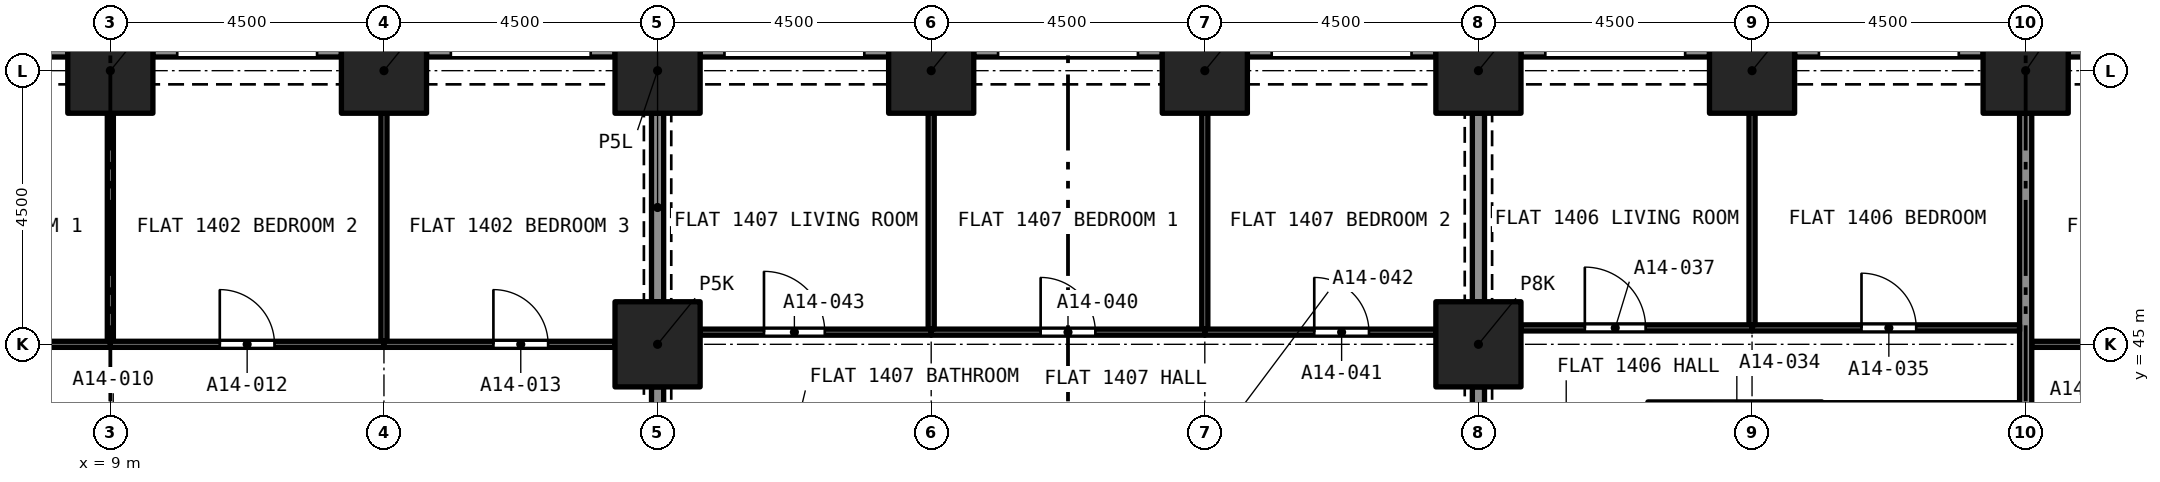
"""IFC4 building model, lengths in metres.
Left out: names, types, materials, properties, quantities, classifications, styles, units other than length and angle.
Written with IfcOpenShell. Run it as: python <this file> out.ifc"""

import sys

from ifc_helpers import new_model, si_unit, direction, frame, frame_2d, origin, origin_2d, place, context, subcontext, project, spatial, rectangle, extrude, element, fill, save


model = new_model("IFC4")
c1 = context("Model", 3, precision=1e-05, world=origin(), true_north=direction((0.0, 1.0)))
c2 = subcontext(c1, "Body", "Model", "MODEL_VIEW")
j1 = project(units=[si_unit("LENGTHUNIT", "METRE"), si_unit("PLANEANGLEUNIT", "RADIAN")], contexts=[c1])
p1 = place(None, origin())
s1 = spatial("IfcSite", under=j1, at=p1, CompositionType="ELEMENT")
p2 = place(p1, origin())
s2 = spatial("IfcBuilding", under=s1, at=p2, CompositionType="ELEMENT")
p3 = place(p2, frame((0.0, 0.0, 56.0)))
s3 = spatial("IfcBuildingStorey", under=s2, at=p3, CompositionType="ELEMENT", Elevation=56.0)
for number, where, z_axis, x_axis in (
    (1, (18.0, 45.0, 0.0), (0.0, 0.0, 1.0), (1.0, 0.0, 0.0)),
    (2, (31.5, 45.0, 0.0), (0.0, 0.0, 1.0), (1.0, 0.0, 0.0)),
    (3, (9.0, 49.5, 0.0), (0.0, 0.0, 1.0), (1.0, 0.0, 0.0)),
    (4, (13.5, 49.5, 0.0), (0.0, 0.0, 1.0), (1.0, 0.0, 0.0)),
    (5, (18.0, 49.5, 0.0), (0.0, 0.0, 1.0), (1.0, 0.0, 0.0)),
    (6, (22.5, 49.5, 0.0), (0.0, 0.0, 1.0), (1.0, 0.0, 0.0)),
    (7, (27.0, 49.5, 0.0), (0.0, 0.0, 1.0), (1.0, 0.0, 0.0)),
    (8, (31.5, 49.5, 0.0), (0.0, 0.0, 1.0), (1.0, 0.0, 0.0)),
    (9, (36.0, 49.5, 0.0), (0.0, 0.0, 1.0), (1.0, 0.0, 0.0)),
    (10, (40.5, 49.5, 0.0), (0.0, 0.0, 1.0), (1.0, 0.0, 0.0)),
):
    element("IfcColumn", number, at=place(p3, frame(where, z_axis=z_axis, x_axis=x_axis)), inside=s3, PredefinedType="COLUMN", context=c2, shape_type="SweptSolid", body=[
        extrude(rectangle(XDim=1.4, YDim=1.4, at=origin_2d()), origin(), (0.0, 0.0, 1.0), 3.2),
    ])
p4 = place(p3, frame((41.2, 49.875, 0.0), z_axis=(0.0, 0.0, 1.0), x_axis=(1.0, 0.0, 0.0)))
e11 = element("IfcWall", 11, at=p4, inside=s3, PredefinedType="SOLIDWALL", context=c2, shape_type="SweptSolid", body=[
    extrude(rectangle(XDim=3.1, YDim=0.3, at=frame_2d((1.55, 0.0))), origin(), (0.0, 0.0, 1.0), 3.2),
])
p5 = place(p4, frame((0.4, 0.0, 0.45)))
e12 = element("IfcOpeningElement", 12, at=p5, cuts=e11, PredefinedType="OPENING", context=c2, shape_type="SweptSolid", body=[
    extrude(rectangle(XDim=2.3, YDim=1.95, at=frame_2d((1.15, 0.975))), frame((0.0, 0.16, 0.0), z_axis=(0.0, -1.0, 0.0), x_axis=(1.0, 0.0, 0.0)), (0.0, 0.0, 1.0), 0.32),
])
p6 = place(p3, frame((36.7, 49.875, 0.0), z_axis=(0.0, 0.0, 1.0), x_axis=(1.0, 0.0, 0.0)))
e13 = element("IfcWall", 13, at=p6, inside=s3, PredefinedType="SOLIDWALL", context=c2, shape_type="SweptSolid", body=[
    extrude(rectangle(XDim=3.1, YDim=0.3, at=frame_2d((1.55, 0.0))), origin(), (0.0, 0.0, 1.0), 3.2),
])
p7 = place(p6, frame((0.4, 0.0, 0.45)))
e14 = element("IfcOpeningElement", 14, at=p7, cuts=e13, PredefinedType="OPENING", context=c2, shape_type="SweptSolid", body=[
    extrude(rectangle(XDim=2.3, YDim=1.95, at=frame_2d((1.15, 0.975))), frame((0.0, 0.16, 0.0), z_axis=(0.0, -1.0, 0.0), x_axis=(1.0, 0.0, 0.0)), (0.0, 0.0, 1.0), 0.32),
])
p8 = place(p3, frame((32.2, 49.875, 0.0), z_axis=(0.0, 0.0, 1.0), x_axis=(1.0, 0.0, 0.0)))
e15 = element("IfcWall", 15, at=p8, inside=s3, PredefinedType="SOLIDWALL", context=c2, shape_type="SweptSolid", body=[
    extrude(rectangle(XDim=3.1, YDim=0.3, at=frame_2d((1.55, 0.0))), origin(), (0.0, 0.0, 1.0), 3.2),
])
p9 = place(p8, frame((0.4, 0.0, 0.45)))
e16 = element("IfcOpeningElement", 16, at=p9, cuts=e15, PredefinedType="OPENING", context=c2, shape_type="SweptSolid", body=[
    extrude(rectangle(XDim=2.3, YDim=1.95, at=frame_2d((1.15, 0.975))), frame((0.0, 0.16, 0.0), z_axis=(0.0, -1.0, 0.0), x_axis=(1.0, 0.0, 0.0)), (0.0, 0.0, 1.0), 0.32),
])
p10 = place(p3, frame((27.7, 49.875, 0.0), z_axis=(0.0, 0.0, 1.0), x_axis=(1.0, 0.0, 0.0)))
e17 = element("IfcWall", 17, at=p10, inside=s3, PredefinedType="SOLIDWALL", context=c2, shape_type="SweptSolid", body=[
    extrude(rectangle(XDim=3.1, YDim=0.3, at=frame_2d((1.55, 0.0))), origin(), (0.0, 0.0, 1.0), 3.2),
])
p11 = place(p10, frame((0.4, 0.0, 0.45)))
e18 = element("IfcOpeningElement", 18, at=p11, cuts=e17, PredefinedType="OPENING", context=c2, shape_type="SweptSolid", body=[
    extrude(rectangle(XDim=2.3, YDim=1.95, at=frame_2d((1.15, 0.975))), frame((0.0, 0.16, 0.0), z_axis=(0.0, -1.0, 0.0), x_axis=(1.0, 0.0, 0.0)), (0.0, 0.0, 1.0), 0.32),
])
p12 = place(p3, frame((23.2, 49.875, 0.0), z_axis=(0.0, 0.0, 1.0), x_axis=(1.0, 0.0, 0.0)))
e19 = element("IfcWall", 19, at=p12, inside=s3, PredefinedType="SOLIDWALL", context=c2, shape_type="SweptSolid", body=[
    extrude(rectangle(XDim=3.1, YDim=0.3, at=frame_2d((1.55, 0.0))), origin(), (0.0, 0.0, 1.0), 3.2),
])
p13 = place(p12, frame((0.4, 0.0, 0.45)))
e20 = element("IfcOpeningElement", 20, at=p13, cuts=e19, PredefinedType="OPENING", context=c2, shape_type="SweptSolid", body=[
    extrude(rectangle(XDim=2.3, YDim=1.95, at=frame_2d((1.15, 0.975))), frame((0.0, 0.16, 0.0), z_axis=(0.0, -1.0, 0.0), x_axis=(1.0, 0.0, 0.0)), (0.0, 0.0, 1.0), 0.32),
])
p14 = place(p3, frame((18.7, 49.875, 0.0), z_axis=(0.0, 0.0, 1.0), x_axis=(1.0, 0.0, 0.0)))
e21 = element("IfcWall", 21, at=p14, inside=s3, PredefinedType="SOLIDWALL", context=c2, shape_type="SweptSolid", body=[
    extrude(rectangle(XDim=3.1, YDim=0.3, at=frame_2d((1.55, 0.0))), origin(), (0.0, 0.0, 1.0), 3.2),
])
p15 = place(p14, frame((0.4, 0.0, 0.45)))
e22 = element("IfcOpeningElement", 22, at=p15, cuts=e21, PredefinedType="OPENING", context=c2, shape_type="SweptSolid", body=[
    extrude(rectangle(XDim=2.3, YDim=1.95, at=frame_2d((1.15, 0.975))), frame((0.0, 0.16, 0.0), z_axis=(0.0, -1.0, 0.0), x_axis=(1.0, 0.0, 0.0)), (0.0, 0.0, 1.0), 0.32),
])
p16 = place(p3, frame((14.2, 49.875, 0.0), z_axis=(0.0, 0.0, 1.0), x_axis=(1.0, 0.0, 0.0)))
e23 = element("IfcWall", 23, at=p16, inside=s3, PredefinedType="SOLIDWALL", context=c2, shape_type="SweptSolid", body=[
    extrude(rectangle(XDim=3.1, YDim=0.3, at=frame_2d((1.55, 0.0))), origin(), (0.0, 0.0, 1.0), 3.2),
])
p17 = place(p16, frame((0.4, 0.0, 0.45)))
e24 = element("IfcOpeningElement", 24, at=p17, cuts=e23, PredefinedType="OPENING", context=c2, shape_type="SweptSolid", body=[
    extrude(rectangle(XDim=2.3, YDim=1.95, at=frame_2d((1.15, 0.975))), frame((0.0, 0.16, 0.0), z_axis=(0.0, -1.0, 0.0), x_axis=(1.0, 0.0, 0.0)), (0.0, 0.0, 1.0), 0.32),
])
p18 = place(p3, frame((9.7, 49.875, 0.0), z_axis=(0.0, 0.0, 1.0), x_axis=(1.0, 0.0, 0.0)))
e25 = element("IfcWall", 25, at=p18, inside=s3, PredefinedType="SOLIDWALL", context=c2, shape_type="SweptSolid", body=[
    extrude(rectangle(XDim=3.1, YDim=0.3, at=frame_2d((1.55, 0.0))), origin(), (0.0, 0.0, 1.0), 3.2),
])
p19 = place(p18, frame((0.4, 0.0, 0.45)))
e26 = element("IfcOpeningElement", 26, at=p19, cuts=e25, PredefinedType="OPENING", context=c2, shape_type="SweptSolid", body=[
    extrude(rectangle(XDim=2.3, YDim=1.95, at=frame_2d((1.15, 0.975))), frame((0.0, 0.16, 0.0), z_axis=(0.0, -1.0, 0.0), x_axis=(1.0, 0.0, 0.0)), (0.0, 0.0, 1.0), 0.32),
])
p20 = place(p3, frame((5.2, 49.875, 0.0), z_axis=(0.0, 0.0, 1.0), x_axis=(1.0, 0.0, 0.0)))
e27 = element("IfcWall", 27, at=p20, inside=s3, PredefinedType="SOLIDWALL", context=c2, shape_type="SweptSolid", body=[
    extrude(rectangle(XDim=3.1, YDim=0.3, at=frame_2d((1.55, 0.0))), origin(), (0.0, 0.0, 1.0), 3.2),
])
p21 = place(p20, frame((0.4, 0.0, 0.45)))
e28 = element("IfcOpeningElement", 28, at=p21, cuts=e27, PredefinedType="OPENING", context=c2, shape_type="SweptSolid", body=[
    extrude(rectangle(XDim=2.3, YDim=1.95, at=frame_2d((1.15, 0.975))), frame((0.0, 0.16, 0.0), z_axis=(0.0, -1.0, 0.0), x_axis=(1.0, 0.0, 0.0)), (0.0, 0.0, 1.0), 0.32),
])
p22 = place(p3, frame((9.0, 45.05, 0.0), z_axis=(0.0, 0.0, 1.0), x_axis=(0.0, 1.0, 0.0)))
e29 = element("IfcWall", 29, at=p22, inside=s3, PredefinedType="PARTITIONING", context=c2, shape_type="SweptSolid", body=[
    extrude(rectangle(XDim=3.75, YDim=0.1, at=frame_2d((1.875, 0.0))), origin(), (0.0, 0.0, 1.0), 2.9),
])
p23 = place(p3, frame((4.5, 45.0, 0.0), z_axis=(0.0, 0.0, 1.0), x_axis=(1.0, 0.0, 0.0)))
e30 = element("IfcWall", 30, at=p23, inside=s3, PredefinedType="PARTITIONING", context=c2, shape_type="SweptSolid", body=[
    extrude(rectangle(XDim=4.5, YDim=0.1, at=frame_2d((2.25, 0.0))), origin(), (0.0, 0.0, 1.0), 2.9),
])
p24 = place(p23, frame((1.8, 0.0, 0.0)))
e31 = element("IfcOpeningElement", 31, at=p24, cuts=e30, PredefinedType="OPENING", context=c2, shape_type="SweptSolid", body=[
    extrude(rectangle(XDim=0.9, YDim=2.1, at=frame_2d((0.45, 1.05))), frame((0.0, 0.06, 0.0), z_axis=(0.0, -1.0, 0.0), x_axis=(1.0, 0.0, 0.0)), (0.0, 0.0, 1.0), 0.12),
])
p25 = place(p3, frame((13.5, 45.05, 0.0), z_axis=(0.0, 0.0, 1.0), x_axis=(0.0, 1.0, 0.0)))
e32 = element("IfcWall", 32, at=p25, inside=s3, PredefinedType="PARTITIONING", context=c2, shape_type="SweptSolid", body=[
    extrude(rectangle(XDim=3.75, YDim=0.1, at=frame_2d((1.875, 0.0))), origin(), (0.0, 0.0, 1.0), 2.9),
])
p26 = place(p3, frame((9.0, 45.0, 0.0), z_axis=(0.0, 0.0, 1.0), x_axis=(1.0, 0.0, 0.0)))
e33 = element("IfcWall", 33, at=p26, inside=s3, PredefinedType="PARTITIONING", context=c2, shape_type="SweptSolid", body=[
    extrude(rectangle(XDim=4.5, YDim=0.1, at=frame_2d((2.25, 0.0))), origin(), (0.0, 0.0, 1.0), 2.9),
])
p27 = place(p26, frame((1.8, 0.0, 0.0)))
e34 = element("IfcOpeningElement", 34, at=p27, cuts=e33, PredefinedType="OPENING", context=c2, shape_type="SweptSolid", body=[
    extrude(rectangle(XDim=0.9, YDim=2.1, at=frame_2d((0.45, 1.05))), frame((0.0, 0.06, 0.0), z_axis=(0.0, -1.0, 0.0), x_axis=(1.0, 0.0, 0.0)), (0.0, 0.0, 1.0), 0.12),
])
p28 = place(p3, frame((13.5, 45.0, 0.0), z_axis=(0.0, 0.0, 1.0), x_axis=(1.0, 0.0, 0.0)))
e35 = element("IfcWall", 35, at=p28, inside=s3, PredefinedType="PARTITIONING", context=c2, shape_type="SweptSolid", body=[
    extrude(rectangle(XDim=3.8, YDim=0.1, at=frame_2d((1.9, 0.0))), origin(), (0.0, 0.0, 1.0), 2.9),
])
p29 = place(p28, frame((1.8, 0.0, 0.0)))
e36 = element("IfcOpeningElement", 36, at=p29, cuts=e35, PredefinedType="OPENING", context=c2, shape_type="SweptSolid", body=[
    extrude(rectangle(XDim=0.9, YDim=2.1, at=frame_2d((0.45, 1.05))), frame((0.0, 0.06, 0.0), z_axis=(0.0, -1.0, 0.0), x_axis=(1.0, 0.0, 0.0)), (0.0, 0.0, 1.0), 0.12),
])
p30 = place(p3, frame((18.0, 45.7, 0.0), z_axis=(0.0, 0.0, 1.0), x_axis=(0.0, 1.0, 0.0)))
e37 = element("IfcWall", 37, at=p30, inside=s3, PredefinedType="PARTITIONING", context=c2, shape_type="SweptSolid", body=[
    extrude(rectangle(XDim=3.1, YDim=0.2, at=frame_2d((1.55, 0.0))), origin(), (0.0, 0.0, 1.0), 2.38),
])
p31 = place(p3, frame((18.0, 43.718, 0.0), z_axis=(0.0, 0.0, 1.0), x_axis=(0.0, 1.0, 0.0)))
e38 = element("IfcWall", 38, at=p31, inside=s3, PredefinedType="PARTITIONING", context=c2, shape_type="SweptSolid", body=[
    extrude(rectangle(XDim=0.583, YDim=0.2, at=frame_2d((0.291, 0.0))), origin(), (0.0, 0.0, 1.0), 2.38),
])
p32 = place(p3, frame((40.6, 45.0, 0.0), z_axis=(0.0, 0.0, 1.0), x_axis=(1.0, 0.0, 0.0)))
e39 = element("IfcWall", 39, at=p32, inside=s3, PredefinedType="PARTITIONING", context=c2, shape_type="SweptSolid", body=[
    extrude(rectangle(XDim=4.4, YDim=0.1, at=frame_2d((2.2, 0.0))), origin(), (0.0, 0.0, 1.0), 2.9),
])
p33 = place(p32, frame((1.7, 0.0, 0.0)))
e40 = element("IfcOpeningElement", 40, at=p33, cuts=e39, PredefinedType="OPENING", context=c2, shape_type="SweptSolid", body=[
    extrude(rectangle(XDim=0.9, YDim=2.1, at=frame_2d((0.45, 1.05))), frame((0.0, 0.06, 0.0), z_axis=(0.0, -1.0, 0.0), x_axis=(1.0, 0.0, 0.0)), (0.0, 0.0, 1.0), 0.12),
])
p34 = place(p3, frame((40.5, 43.94, 0.0), z_axis=(0.0, 0.0, 1.0), x_axis=(0.0, 1.0, 0.0)))
e41 = element("IfcWall", 41, at=p34, inside=s3, PredefinedType="PARTITIONING", context=c2, shape_type="SweptSolid", body=[
    extrude(rectangle(XDim=4.86, YDim=0.2, at=frame_2d((2.43, 0.0))), origin(), (0.0, 0.0, 1.0), 2.9),
])
p35 = place(p3, frame((37.15, 43.99, 0.0), z_axis=(0.0, 0.0, 1.0), x_axis=(-1.0, 0.0, 0.0)))
e42 = element("IfcWall", 42, at=p35, inside=s3, PredefinedType="PARTITIONING", context=c2, shape_type="SweptSolid", body=[
    extrude(rectangle(XDim=2.862, YDim=0.125, at=frame_2d((1.431, 0.0))), origin(), (0.0, 0.0, 1.0), 2.9),
])
p36 = place(p35, frame((1.0, 0.0, 0.0)))
e43 = element("IfcOpeningElement", 43, at=p36, cuts=e42, PredefinedType="OPENING", context=c2, shape_type="SweptSolid", body=[
    extrude(rectangle(XDim=0.8, YDim=2.1, at=frame_2d((0.4, 1.05))), frame((0.0, 0.073, 0.0), z_axis=(0.0, -1.0, 0.0), x_axis=(1.0, 0.0, 0.0)), (0.0, 0.0, 1.0), 0.145),
])
p37 = place(p3, frame((36.0, 45.27, 0.0), z_axis=(0.0, 0.0, 1.0), x_axis=(1.0, 0.0, 0.0)))
e44 = element("IfcWall", 44, at=p37, inside=s3, PredefinedType="PARTITIONING", context=c2, shape_type="SweptSolid", body=[
    extrude(rectangle(XDim=4.4, YDim=0.1, at=frame_2d((2.2, 0.0))), origin(), (0.0, 0.0, 1.0), 2.9),
])
p38 = place(p37, frame((1.8, 0.0, 0.0)))
e45 = element("IfcOpeningElement", 45, at=p38, cuts=e44, PredefinedType="OPENING", context=c2, shape_type="SweptSolid", body=[
    extrude(rectangle(XDim=0.9, YDim=2.1, at=frame_2d((0.45, 1.05))), frame((0.0, 0.06, 0.0), z_axis=(0.0, -1.0, 0.0), x_axis=(1.0, 0.0, 0.0)), (0.0, 0.0, 1.0), 0.12),
])
p39 = place(p3, frame((36.0, 45.32, 0.0), z_axis=(0.0, 0.0, 1.0), x_axis=(0.0, 1.0, 0.0)))
e46 = element("IfcWall", 46, at=p39, inside=s3, PredefinedType="PARTITIONING", context=c2, shape_type="SweptSolid", body=[
    extrude(rectangle(XDim=3.48, YDim=0.1, at=frame_2d((1.74, 0.0))), origin(), (0.0, 0.0, 1.0), 2.9),
])
p40 = place(p3, frame((32.2, 45.27, 0.0), z_axis=(0.0, 0.0, 1.0), x_axis=(1.0, 0.0, 0.0)))
e47 = element("IfcWall", 47, at=p40, inside=s3, PredefinedType="PARTITIONING", context=c2, shape_type="SweptSolid", body=[
    extrude(rectangle(XDim=3.8, YDim=0.1, at=frame_2d((1.9, 0.0))), origin(), (0.0, 0.0, 1.0), 2.9),
])
p41 = place(p40, frame((1.05, 0.0, 0.0)))
e48 = element("IfcOpeningElement", 48, at=p41, cuts=e47, PredefinedType="OPENING", context=c2, shape_type="SweptSolid", body=[
    extrude(rectangle(XDim=1.0, YDim=2.1, at=frame_2d((0.5, 1.05))), frame((0.0, 0.06, 0.0), z_axis=(0.0, -1.0, 0.0), x_axis=(1.0, 0.0, 0.0)), (0.0, 0.0, 1.0), 0.12),
])
for number, where, z_axis, x_axis in (
    (49, (31.5, 41.2, 0.0), (0.0, 0.0, 1.0), (0.0, 1.0, 0.0)),
    (50, (31.5, 45.7, 0.0), (0.0, 0.0, 1.0), (0.0, 1.0, 0.0)),
):
    element("IfcWall", number, at=place(p3, frame(where, z_axis=z_axis, x_axis=x_axis)), inside=s3, PredefinedType="PARTITIONING", context=c2, shape_type="SweptSolid", body=[
        extrude(rectangle(XDim=3.1, YDim=0.2, at=frame_2d((1.55, 0.0))), origin(), (0.0, 0.0, 1.0), 2.38),
    ])
p42 = place(p3, frame((27.0, 45.25, 0.0), z_axis=(0.0, 0.0, 1.0), x_axis=(0.0, 1.0, 0.0)))
e51 = element("IfcWall", 51, at=p42, inside=s3, PredefinedType="PARTITIONING", context=c2, shape_type="SweptSolid", body=[
    extrude(rectangle(XDim=3.55, YDim=0.1, at=frame_2d((1.775, 0.0))), origin(), (0.0, 0.0, 1.0), 2.75),
])
p43 = place(p3, frame((22.5, 45.2, 0.0), z_axis=(0.0, 0.0, 1.0), x_axis=(1.0, 0.0, 0.0)))
e52 = element("IfcWall", 52, at=p43, inside=s3, PredefinedType="PARTITIONING", context=c2, shape_type="SweptSolid", body=[
    extrude(rectangle(XDim=4.5, YDim=0.1, at=frame_2d((2.25, 0.0))), origin(), (0.0, 0.0, 1.0), 2.75),
])
p44 = place(p43, frame((1.8, 0.0, 0.0)))
e53 = element("IfcOpeningElement", 53, at=p44, cuts=e52, PredefinedType="OPENING", context=c2, shape_type="SweptSolid", body=[
    extrude(rectangle(XDim=0.9, YDim=2.1, at=frame_2d((0.45, 1.05))), frame((0.0, 0.06, 0.0), z_axis=(0.0, -1.0, 0.0), x_axis=(1.0, 0.0, 0.0)), (0.0, 0.0, 1.0), 0.12),
])
p45 = place(p3, frame((22.5, 45.25, 0.0), z_axis=(0.0, 0.0, 1.0), x_axis=(0.0, 1.0, 0.0)))
e54 = element("IfcWall", 54, at=p45, inside=s3, PredefinedType="PARTITIONING", context=c2, shape_type="SweptSolid", body=[
    extrude(rectangle(XDim=3.55, YDim=0.1, at=frame_2d((1.775, 0.0))), origin(), (0.0, 0.0, 1.0), 2.75),
])
p46 = place(p3, frame((27.0, 45.2, 0.0), z_axis=(0.0, 0.0, 1.0), x_axis=(1.0, 0.0, 0.0)))
e55 = element("IfcWall", 55, at=p46, inside=s3, PredefinedType="PARTITIONING", context=c2, shape_type="SweptSolid", body=[
    extrude(rectangle(XDim=3.8, YDim=0.1, at=frame_2d((1.9, 0.0))), origin(), (0.0, 0.0, 1.0), 2.75),
])
p47 = place(p46, frame((1.8, 0.0, 0.0)))
e56 = element("IfcOpeningElement", 56, at=p47, cuts=e55, PredefinedType="OPENING", context=c2, shape_type="SweptSolid", body=[
    extrude(rectangle(XDim=0.9, YDim=2.1, at=frame_2d((0.45, 1.05))), frame((0.0, 0.06, 0.0), z_axis=(0.0, -1.0, 0.0), x_axis=(1.0, 0.0, 0.0)), (0.0, 0.0, 1.0), 0.12),
])
p48 = place(p3, frame((18.7, 45.2, 0.0), z_axis=(0.0, 0.0, 1.0), x_axis=(1.0, 0.0, 0.0)))
e57 = element("IfcWall", 57, at=p48, inside=s3, PredefinedType="PARTITIONING", context=c2, shape_type="SweptSolid", body=[
    extrude(rectangle(XDim=3.8, YDim=0.1, at=frame_2d((1.9, 0.0))), origin(), (0.0, 0.0, 1.0), 2.75),
])
p49 = place(p48, frame((1.05, 0.0, 0.0)))
e58 = element("IfcOpeningElement", 58, at=p49, cuts=e57, PredefinedType="OPENING", context=c2, shape_type="SweptSolid", body=[
    extrude(rectangle(XDim=1.0, YDim=2.1, at=frame_2d((0.5, 1.05))), frame((0.0, 0.06, 0.0), z_axis=(0.0, -1.0, 0.0), x_axis=(1.0, 0.0, 0.0)), (0.0, 0.0, 1.0), 0.12),
])
p50 = place(p27, origin())
e59 = element("IfcDoor", 59, at=p50, inside=s3, OperationType="SINGLE_SWING_LEFT", PredefinedType="DOOR", context=c2, shape_type="SweptSolid", body=[
    extrude(rectangle(XDim=0.9, YDim=2.1, at=frame_2d((0.45, 1.05))), frame((0.0, 0.025, 0.0), z_axis=(0.0, -1.0, 0.0), x_axis=(1.0, 0.0, 0.0)), (0.0, 0.0, 1.0), 0.05),
])
fill(e34, e59)
p51 = place(p29, origin())
e60 = element("IfcDoor", 60, at=p51, inside=s3, OperationType="SINGLE_SWING_RIGHT", PredefinedType="DOOR", context=c2, shape_type="SweptSolid", body=[
    extrude(rectangle(XDim=0.9, YDim=2.1, at=frame_2d((0.45, 1.05))), frame((0.0, 0.025, 0.0), z_axis=(0.0, -1.0, 0.0), x_axis=(1.0, 0.0, 0.0)), (0.0, 0.0, 1.0), 0.05),
])
fill(e36, e60)
p52 = place(p38, origin())
e61 = element("IfcDoor", 61, at=p52, inside=s3, OperationType="SINGLE_SWING_RIGHT", PredefinedType="DOOR", context=c2, shape_type="SweptSolid", body=[
    extrude(rectangle(XDim=0.9, YDim=2.1, at=frame_2d((0.45, 1.05))), frame((0.0, 0.025, 0.0), z_axis=(0.0, -1.0, 0.0), x_axis=(1.0, 0.0, 0.0)), (0.0, 0.0, 1.0), 0.05),
])
fill(e45, e61)
p53 = place(p41, origin())
e62 = element("IfcDoor", 62, at=p53, inside=s3, OperationType="SINGLE_SWING_LEFT", PredefinedType="DOOR", context=c2, shape_type="SweptSolid", body=[
    extrude(rectangle(XDim=1.0, YDim=2.1, at=frame_2d((0.5, 1.05))), frame((0.0, 0.025, 0.0), z_axis=(0.0, -1.0, 0.0), x_axis=(1.0, 0.0, 0.0)), (0.0, 0.0, 1.0), 0.05),
])
fill(e48, e62)
p54 = place(p44, origin())
e63 = element("IfcDoor", 63, at=p54, inside=s3, OperationType="SINGLE_SWING_LEFT", PredefinedType="DOOR", context=c2, shape_type="SweptSolid", body=[
    extrude(rectangle(XDim=0.9, YDim=2.1, at=frame_2d((0.45, 1.05))), frame((0.0, 0.025, 0.0), z_axis=(0.0, -1.0, 0.0), x_axis=(1.0, 0.0, 0.0)), (0.0, 0.0, 1.0), 0.05),
])
fill(e53, e63)
p55 = place(p47, origin())
e64 = element("IfcDoor", 64, at=p55, inside=s3, OperationType="SINGLE_SWING_RIGHT", PredefinedType="DOOR", context=c2, shape_type="SweptSolid", body=[
    extrude(rectangle(XDim=0.9, YDim=2.1, at=frame_2d((0.45, 1.05))), frame((0.0, 0.025, 0.0), z_axis=(0.0, -1.0, 0.0), x_axis=(1.0, 0.0, 0.0)), (0.0, 0.0, 1.0), 0.05),
])
fill(e56, e64)
p56 = place(p49, origin())
e65 = element("IfcDoor", 65, at=p56, inside=s3, OperationType="SINGLE_SWING_LEFT", PredefinedType="DOOR", context=c2, shape_type="SweptSolid", body=[
    extrude(rectangle(XDim=1.0, YDim=2.1, at=frame_2d((0.5, 1.05))), frame((0.0, 0.025, 0.0), z_axis=(0.0, -1.0, 0.0), x_axis=(1.0, 0.0, 0.0)), (0.0, 0.0, 1.0), 0.05),
])
fill(e58, e65)
save(model, sys.argv[1])
